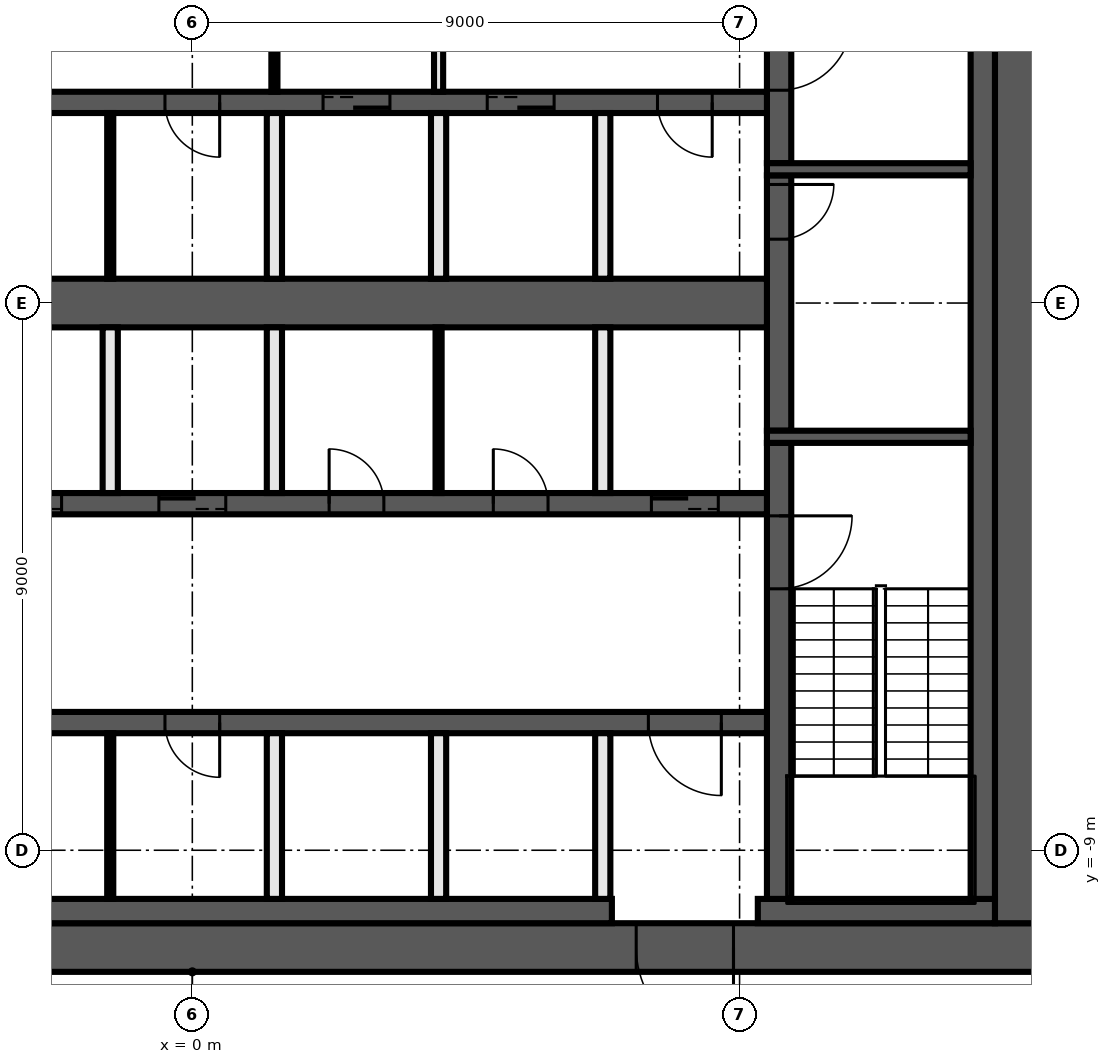
"""IFC4 building model, lengths in metres.
Left out: names, types, materials, properties, quantities, classifications, styles, units other than length and angle.
Written with IfcOpenShell. Run it as: python <this file> out.ifc"""

import sys

from ifc_helpers import new_model, si_unit, direction, frame, frame_2d, origin, place, context, subcontext, project, spatial, rectangle, extrude, element, fill, save


model = new_model("IFC4")
c1 = context("Model", 3, precision=1e-05, world=origin(), true_north=direction((0.0, 1.0)))
c2 = subcontext(c1, "Body", "Model", "MODEL_VIEW")
j1 = project(units=[si_unit("LENGTHUNIT", "METRE"), si_unit("PLANEANGLEUNIT", "RADIAN")], contexts=[c1])
p1 = place(None, origin())
s1 = spatial("IfcSite", under=j1, at=p1, CompositionType="ELEMENT")
p2 = place(p1, origin())
s2 = spatial("IfcBuilding", under=s1, at=p2, CompositionType="ELEMENT")
p3 = place(p2, frame((0.0, 0.0, 179.6)))
s3 = spatial("IfcBuildingStorey", under=s2, at=p3, CompositionType="ELEMENT", Elevation=179.6)
p4 = place(p3, frame((14.0, -10.6, 0.0), z_axis=(0.0, 0.0, 1.0), x_axis=(-1.0, 0.0, 0.0)))
e1 = element("IfcWall", 1, at=p4, inside=s3, PredefinedType="SHEAR", context=c2, shape_type="SweptSolid", body=[
    extrude(rectangle(XDim=28.0, YDim=0.8, at=frame_2d((14.0, 0.0))), origin(), (0.0, 0.0, 1.0), 3.7),
])
p5 = place(p4, frame((5.1, 0.0, 0.0)))
e2 = element("IfcOpeningElement", 2, at=p5, cuts=e1, PredefinedType="OPENING", context=c2, shape_type="SweptSolid", body=[
    extrude(rectangle(XDim=1.6, YDim=2.1, at=frame_2d((0.8, 1.05))), frame((0.0, 0.41, 0.0), z_axis=(0.0, -1.0, 0.0), x_axis=(1.0, 0.0, 0.0)), (0.0, 0.0, 1.0), 0.82),
])
p6 = place(p3, frame((13.6, 10.2, 0.0), z_axis=(0.0, 0.0, 1.0), x_axis=(0.0, -1.0, 0.0)))
e3 = element("IfcWall", 3, at=p6, inside=s3, PredefinedType="SHEAR", context=c2, shape_type="SweptSolid", body=[
    extrude(rectangle(XDim=20.4, YDim=0.8, at=frame_2d((10.2, 0.0))), origin(), (0.0, 0.0, 1.0), 3.7),
])
p7 = place(p3, frame((13.2, -10.0, 0.0), z_axis=(0.0, 0.0, 1.0), x_axis=(-1.0, 0.0, 0.0)))
e4 = element("IfcWall", 4, at=p7, inside=s3, PredefinedType="SHEAR", context=c2, shape_type="SweptSolid", body=[
    extrude(rectangle(XDim=3.9, YDim=0.4, at=frame_2d((1.95, 0.0))), origin(), (0.0, 0.0, 1.0), 3.7),
])
p8 = place(p3, frame((6.9, -10.0, 0.0), z_axis=(0.0, 0.0, 1.0), x_axis=(-1.0, 0.0, 0.0)))
e5 = element("IfcWall", 5, at=p8, inside=s3, PredefinedType="SHEAR", context=c2, shape_type="SweptSolid", body=[
    extrude(rectangle(XDim=20.1, YDim=0.4, at=frame_2d((10.05, 0.0))), origin(), (0.0, 0.0, 1.0), 3.7),
])
p9 = place(p3, frame((13.0, 9.8, 0.0), z_axis=(0.0, 0.0, 1.0), x_axis=(0.0, -1.0, 0.0)))
e6 = element("IfcWall", 6, at=p9, inside=s3, PredefinedType="SHEAR", context=c2, shape_type="SweptSolid", body=[
    extrude(rectangle(XDim=19.6, YDim=0.4, at=frame_2d((9.8, 0.0))), origin(), (0.0, 0.0, 1.0), 3.7),
])
p10 = place(p3, frame((9.65, -2.3, 0.0), z_axis=(0.0, 0.0, 1.0), x_axis=(0.0, -1.0, 0.0)))
e7 = element("IfcWall", 7, at=p10, inside=s3, PredefinedType="SHEAR", context=c2, shape_type="SweptSolid", body=[
    extrude(rectangle(XDim=7.5, YDim=0.4, at=frame_2d((3.75, 0.0))), origin(), (0.0, 0.0, 1.0), 3.7),
])
p11 = place(p10, frame((1.2, 0.0, 0.0)))
e8 = element("IfcOpeningElement", 8, at=p11, cuts=e7, PredefinedType="OPENING", context=c2, shape_type="SweptSolid", body=[
    extrude(rectangle(XDim=1.2, YDim=2.1, at=frame_2d((0.6, 1.05))), frame((0.0, 0.21, 0.0), z_axis=(0.0, -1.0, 0.0), x_axis=(1.0, 0.0, 0.0)), (0.0, 0.0, 1.0), 0.42),
])
p12 = place(p3, frame((9.65, 2.1, 0.0), z_axis=(0.0, 0.0, 1.0), x_axis=(0.0, -1.0, 0.0)))
e9 = element("IfcWall", 9, at=p12, inside=s3, PredefinedType="SHEAR", context=c2, shape_type="SweptSolid", body=[
    extrude(rectangle(XDim=4.2, YDim=0.4, at=frame_2d((2.1, 0.0))), origin(), (0.0, 0.0, 1.0), 3.7),
])
p13 = place(p12, frame((0.15, 0.0, 0.0)))
e10 = element("IfcOpeningElement", 10, at=p13, cuts=e9, PredefinedType="OPENING", context=c2, shape_type="SweptSolid", body=[
    extrude(rectangle(XDim=0.9, YDim=2.1, at=frame_2d((0.45, 1.05))), frame((0.0, 0.21, 0.0), z_axis=(0.0, -1.0, 0.0), x_axis=(1.0, 0.0, 0.0)), (0.0, 0.0, 1.0), 0.42),
])
p14 = place(p3, frame((9.65, 9.8, 0.0), z_axis=(0.0, 0.0, 1.0), x_axis=(0.0, -1.0, 0.0)))
e11 = element("IfcWall", 11, at=p14, inside=s3, PredefinedType="SHEAR", context=c2, shape_type="SweptSolid", body=[
    extrude(rectangle(XDim=7.5, YDim=0.4, at=frame_2d((3.75, 0.0))), origin(), (0.0, 0.0, 1.0), 3.7),
])
p15 = place(p14, frame((5.1, 0.0, 0.0)))
e12 = element("IfcOpeningElement", 12, at=p15, cuts=e11, PredefinedType="OPENING", context=c2, shape_type="SweptSolid", body=[
    extrude(rectangle(XDim=1.2, YDim=2.1, at=frame_2d((0.6, 1.05))), frame((0.0, 0.21, 0.0), z_axis=(0.0, -1.0, 0.0), x_axis=(1.0, 0.0, 0.0)), (0.0, 0.0, 1.0), 0.42),
])
for number, where, z_axis, x_axis in (
    (13, (9.45, 2.2, 0.0), (0.0, 0.0, 1.0), (1.0, 0.0, 0.0)),
    (14, (9.45, -2.2, 0.0), (0.0, 0.0, 1.0), (1.0, 0.0, 0.0)),
):
    element("IfcWall", number, at=place(p3, frame(where, z_axis=z_axis, x_axis=x_axis)), inside=s3, PredefinedType="SHEAR", context=c2, shape_type="SweptSolid", body=[
        extrude(rectangle(XDim=3.35, YDim=0.2, at=frame_2d((1.675, 0.0))), origin(), (0.0, 0.0, 1.0), 3.7),
    ])
p16 = place(p3, frame((9.45, 3.3, 0.0), z_axis=(0.0, 0.0, 1.0), x_axis=(-1.0, 0.0, 0.0)))
e15 = element("IfcWall", 15, at=p16, inside=s3, PredefinedType="SHEAR", context=c2, shape_type="SweptSolid", body=[
    extrude(rectangle(XDim=18.9, YDim=0.35, at=frame_2d((9.45, 0.0))), origin(), (0.0, 0.0, 1.0), 3.7),
])
p17 = place(p16, frame((6.2, 0.0, 0.0)))
e16 = element("IfcOpeningElement", 16, at=p17, cuts=e15, PredefinedType="OPENING", context=c2, shape_type="SweptSolid", body=[
    extrude(rectangle(XDim=1.1, YDim=2.1, at=frame_2d((0.55, 1.05))), frame((0.0, 0.185, 0.0), z_axis=(0.0, -1.0, 0.0), x_axis=(1.0, 0.0, 0.0)), (0.0, 0.0, 1.0), 0.37),
])
p18 = place(p16, frame((3.5, 0.0, 0.0)))
e17 = element("IfcOpeningElement", 17, at=p18, cuts=e15, PredefinedType="OPENING", context=c2, shape_type="SweptSolid", body=[
    extrude(rectangle(XDim=1.1, YDim=2.1, at=frame_2d((0.55, 1.05))), frame((0.0, 0.185, 0.0), z_axis=(0.0, -1.0, 0.0), x_axis=(1.0, 0.0, 0.0)), (0.0, 0.0, 1.0), 0.37),
])
p19 = place(p16, frame((0.9, 0.0, 0.0)))
e18 = element("IfcOpeningElement", 18, at=p19, cuts=e15, PredefinedType="OPENING", context=c2, shape_type="SweptSolid", body=[
    extrude(rectangle(XDim=0.9, YDim=2.1, at=frame_2d((0.45, 1.05))), frame((0.0, 0.185, 0.0), z_axis=(0.0, -1.0, 0.0), x_axis=(1.0, 0.0, 0.0)), (0.0, 0.0, 1.0), 0.37),
])
p20 = place(p16, frame((14.4, 0.0, 0.0)))
e19 = element("IfcOpeningElement", 19, at=p20, cuts=e15, PredefinedType="OPENING", context=c2, shape_type="SweptSolid", body=[
    extrude(rectangle(XDim=0.9, YDim=2.1, at=frame_2d((0.45, 1.05))), frame((0.0, 0.185, 0.0), z_axis=(0.0, -1.0, 0.0), x_axis=(1.0, 0.0, 0.0)), (0.0, 0.0, 1.0), 0.37),
])
p21 = place(p16, frame((9.0, 0.0, 0.0)))
e20 = element("IfcOpeningElement", 20, at=p21, cuts=e15, PredefinedType="OPENING", context=c2, shape_type="SweptSolid", body=[
    extrude(rectangle(XDim=0.9, YDim=2.1, at=frame_2d((0.45, 1.05))), frame((0.0, 0.185, 0.0), z_axis=(0.0, -1.0, 0.0), x_axis=(1.0, 0.0, 0.0)), (0.0, 0.0, 1.0), 0.37),
])
p22 = place(p3, frame((-9.45, -3.3, 0.0), z_axis=(0.0, 0.0, 1.0), x_axis=(1.0, 0.0, 0.0)))
e21 = element("IfcWall", 21, at=p22, inside=s3, PredefinedType="SHEAR", context=c2, shape_type="SweptSolid", body=[
    extrude(rectangle(XDim=18.9, YDim=0.35, at=frame_2d((9.45, 0.0))), origin(), (0.0, 0.0, 1.0), 3.7),
])
p23 = place(p22, frame((0.8, 0.0, 0.0)))
e22 = element("IfcOpeningElement", 22, at=p23, cuts=e21, PredefinedType="OPENING", context=c2, shape_type="SweptSolid", body=[
    extrude(rectangle(XDim=1.1, YDim=2.1, at=frame_2d((0.55, 1.05))), frame((0.0, 0.185, 0.0), z_axis=(0.0, -1.0, 0.0), x_axis=(1.0, 0.0, 0.0)), (0.0, 0.0, 1.0), 0.37),
])
p24 = place(p22, frame((3.5, 0.0, 0.0)))
e23 = element("IfcOpeningElement", 23, at=p24, cuts=e21, PredefinedType="OPENING", context=c2, shape_type="SweptSolid", body=[
    extrude(rectangle(XDim=1.1, YDim=2.1, at=frame_2d((0.55, 1.05))), frame((0.0, 0.185, 0.0), z_axis=(0.0, -1.0, 0.0), x_axis=(1.0, 0.0, 0.0)), (0.0, 0.0, 1.0), 0.37),
])
p25 = place(p22, frame((6.2, 0.0, 0.0)))
e24 = element("IfcOpeningElement", 24, at=p25, cuts=e21, PredefinedType="OPENING", context=c2, shape_type="SweptSolid", body=[
    extrude(rectangle(XDim=1.1, YDim=2.1, at=frame_2d((0.55, 1.05))), frame((0.0, 0.185, 0.0), z_axis=(0.0, -1.0, 0.0), x_axis=(1.0, 0.0, 0.0)), (0.0, 0.0, 1.0), 0.37),
])
p26 = place(p22, frame((8.9, 0.0, 0.0)))
e25 = element("IfcOpeningElement", 25, at=p26, cuts=e21, PredefinedType="OPENING", context=c2, shape_type="SweptSolid", body=[
    extrude(rectangle(XDim=1.1, YDim=2.1, at=frame_2d((0.55, 1.05))), frame((0.0, 0.185, 0.0), z_axis=(0.0, -1.0, 0.0), x_axis=(1.0, 0.0, 0.0)), (0.0, 0.0, 1.0), 0.37),
])
p27 = place(p22, frame((17.0, 0.0, 0.0)))
e26 = element("IfcOpeningElement", 26, at=p27, cuts=e21, PredefinedType="OPENING", context=c2, shape_type="SweptSolid", body=[
    extrude(rectangle(XDim=1.1, YDim=2.1, at=frame_2d((0.55, 1.05))), frame((0.0, 0.185, 0.0), z_axis=(0.0, -1.0, 0.0), x_axis=(1.0, 0.0, 0.0)), (0.0, 0.0, 1.0), 0.37),
])
p28 = place(p22, frame((11.7, 0.0, 0.0)))
e27 = element("IfcOpeningElement", 27, at=p28, cuts=e21, PredefinedType="OPENING", context=c2, shape_type="SweptSolid", body=[
    extrude(rectangle(XDim=0.9, YDim=2.1, at=frame_2d((0.45, 1.05))), frame((0.0, 0.185, 0.0), z_axis=(0.0, -1.0, 0.0), x_axis=(1.0, 0.0, 0.0)), (0.0, 0.0, 1.0), 0.37),
])
p29 = place(p22, frame((14.4, 0.0, 0.0)))
e28 = element("IfcOpeningElement", 28, at=p29, cuts=e21, PredefinedType="OPENING", context=c2, shape_type="SweptSolid", body=[
    extrude(rectangle(XDim=0.9, YDim=2.1, at=frame_2d((0.45, 1.05))), frame((0.0, 0.185, 0.0), z_axis=(0.0, -1.0, 0.0), x_axis=(1.0, 0.0, 0.0)), (0.0, 0.0, 1.0), 0.37),
])
p30 = place(p3, frame((9.45, -6.9, 0.0), z_axis=(0.0, 0.0, 1.0), x_axis=(-1.0, 0.0, 0.0)))
e29 = element("IfcWall", 29, at=p30, inside=s3, PredefinedType="SHEAR", context=c2, shape_type="SweptSolid", body=[
    extrude(rectangle(XDim=18.9, YDim=0.35, at=frame_2d((9.45, 0.0))), origin(), (0.0, 0.0, 1.0), 3.7),
])
p31 = place(p30, frame((0.75, 0.0, 0.0)))
e30 = element("IfcOpeningElement", 30, at=p31, cuts=e29, PredefinedType="OPENING", context=c2, shape_type="SweptSolid", body=[
    extrude(rectangle(XDim=1.2, YDim=2.1, at=frame_2d((0.6, 1.05))), frame((0.0, 0.185, 0.0), z_axis=(0.0, -1.0, 0.0), x_axis=(1.0, 0.0, 0.0)), (0.0, 0.0, 1.0), 0.37),
])
p32 = place(p30, frame((14.4, 0.0, 0.0)))
e31 = element("IfcOpeningElement", 31, at=p32, cuts=e29, PredefinedType="OPENING", context=c2, shape_type="SweptSolid", body=[
    extrude(rectangle(XDim=0.9, YDim=2.1, at=frame_2d((0.45, 1.05))), frame((0.0, 0.185, 0.0), z_axis=(0.0, -1.0, 0.0), x_axis=(1.0, 0.0, 0.0)), (0.0, 0.0, 1.0), 0.37),
])
p33 = place(p30, frame((9.0, 0.0, 0.0)))
e32 = element("IfcOpeningElement", 32, at=p33, cuts=e29, PredefinedType="OPENING", context=c2, shape_type="SweptSolid", body=[
    extrude(rectangle(XDim=0.9, YDim=2.1, at=frame_2d((0.45, 1.05))), frame((0.0, 0.185, 0.0), z_axis=(0.0, -1.0, 0.0), x_axis=(1.0, 0.0, 0.0)), (0.0, 0.0, 1.0), 0.37),
])
p34 = place(p3, frame((-9.45, 0.0, 0.0), z_axis=(0.0, 0.0, 1.0), x_axis=(1.0, 0.0, 0.0)))
e33 = element("IfcWall", 33, at=p34, inside=s3, PredefinedType="SHEAR", context=c2, shape_type="SweptSolid", body=[
    extrude(rectangle(XDim=18.9, YDim=0.8, at=frame_2d((9.45, 0.0))), origin(), (0.0, 0.0, 1.0), 3.7),
])
for number, where, z_axis, x_axis in (
    (34, (6.75, -9.8, 0.0), (0.0, 0.0, 1.0), (0.0, 1.0, 0.0)),
    (35, (6.75, -3.125, 0.0), (0.0, 0.0, 1.0), (0.0, 1.0, 0.0)),
    (36, (6.75, 0.4, 0.0), (0.0, 0.0, 1.0), (0.0, 1.0, 0.0)),
):
    element("IfcWall", number, at=place(p3, frame(where, z_axis=z_axis, x_axis=x_axis)), inside=s3, PredefinedType="SOLIDWALL", context=c2, shape_type="SweptSolid", body=[
        extrude(rectangle(XDim=2.725, YDim=0.25, at=frame_2d((1.363, 0.0))), origin(), (0.0, 0.0, 1.0), 3.7),
    ])
p35 = place(p3, frame((4.05, 6.725, 0.0), z_axis=(0.0, 0.0, 1.0), x_axis=(0.0, -1.0, 0.0)))
e37 = element("IfcWall", 37, at=p35, inside=s3, PredefinedType="PARTITIONING", context=c2, shape_type="SweptSolid", body=[
    extrude(rectangle(XDim=3.25, YDim=0.15, at=frame_2d((1.625, 0.0))), origin(), (0.0, 0.0, 1.0), 3.7),
])
p36 = place(p35, frame((1.025, 0.0, 0.0)))
e38 = element("IfcOpeningElement", 38, at=p36, cuts=e37, PredefinedType="OPENING", context=c2, shape_type="SweptSolid", body=[
    extrude(rectangle(XDim=1.2, YDim=2.1, at=frame_2d((0.6, 1.05))), frame((0.0, 0.085, 0.0), z_axis=(0.0, -1.0, 0.0), x_axis=(1.0, 0.0, 0.0)), (0.0, 0.0, 1.0), 0.17),
])
p37 = place(p3, frame((4.05, -3.125, 0.0), z_axis=(0.0, 0.0, 1.0), x_axis=(0.0, 1.0, 0.0)))
e39 = element("IfcWall", 39, at=p37, inside=s3, PredefinedType="PARTITIONING", context=c2, shape_type="SweptSolid", body=[
    extrude(rectangle(XDim=2.725, YDim=0.1, at=frame_2d((1.363, 0.0))), origin(), (0.0, 0.0, 1.0), 3.7),
])
for number, where, z_axis, x_axis in (
    (40, (4.05, -9.8, 0.0), (0.0, 0.0, 1.0), (0.0, 1.0, 0.0)),
    (41, (4.05, 0.4, 0.0), (0.0, 0.0, 1.0), (0.0, 1.0, 0.0)),
):
    element("IfcWall", number, at=place(p3, frame(where, z_axis=z_axis, x_axis=x_axis)), inside=s3, PredefinedType="SOLIDWALL", context=c2, shape_type="SweptSolid", body=[
        extrude(rectangle(XDim=2.725, YDim=0.25, at=frame_2d((1.363, 0.0))), origin(), (0.0, 0.0, 1.0), 3.7),
    ])
p38 = place(p3, frame((1.35, 6.725, 0.0), z_axis=(0.0, 0.0, 1.0), x_axis=(0.0, -1.0, 0.0)))
e42 = element("IfcWall", 42, at=p38, inside=s3, PredefinedType="PARTITIONING", context=c2, shape_type="SweptSolid", body=[
    extrude(rectangle(XDim=3.25, YDim=0.1, at=frame_2d((1.625, 0.0))), origin(), (0.0, 0.0, 1.0), 3.7),
])
p39 = place(p38, frame((1.025, 0.0, 0.0)))
e43 = element("IfcOpeningElement", 43, at=p39, cuts=e42, PredefinedType="OPENING", context=c2, shape_type="SweptSolid", body=[
    extrude(rectangle(XDim=1.2, YDim=2.1, at=frame_2d((0.6, 1.05))), frame((0.0, 0.06, 0.0), z_axis=(0.0, -1.0, 0.0), x_axis=(1.0, 0.0, 0.0)), (0.0, 0.0, 1.0), 0.12),
])
for number, where, z_axis, x_axis in (
    (44, (1.35, -9.8, 0.0), (0.0, 0.0, 1.0), (0.0, 1.0, 0.0)),
    (45, (1.35, -3.125, 0.0), (0.0, 0.0, 1.0), (0.0, 1.0, 0.0)),
    (46, (1.35, 0.4, 0.0), (0.0, 0.0, 1.0), (0.0, 1.0, 0.0)),
):
    element("IfcWall", number, at=place(p3, frame(where, z_axis=z_axis, x_axis=x_axis)), inside=s3, PredefinedType="SOLIDWALL", context=c2, shape_type="SweptSolid", body=[
        extrude(rectangle(XDim=2.725, YDim=0.25, at=frame_2d((1.363, 0.0))), origin(), (0.0, 0.0, 1.0), 3.7),
    ])
for number, where, z_axis, x_axis in (
    (47, (-1.35, -9.8, 0.0), (0.0, 0.0, 1.0), (0.0, 1.0, 0.0)),
    (48, (-1.35, 0.4, 0.0), (0.0, 0.0, 1.0), (0.0, 1.0, 0.0)),
):
    element("IfcWall", number, at=place(p3, frame(where, z_axis=z_axis, x_axis=x_axis)), inside=s3, PredefinedType="PARTITIONING", context=c2, shape_type="SweptSolid", body=[
        extrude(rectangle(XDim=2.725, YDim=0.1, at=frame_2d((1.363, 0.0))), origin(), (0.0, 0.0, 1.0), 3.7),
    ])
p40 = place(p3, frame((-1.35, -3.125, 0.0), z_axis=(0.0, 0.0, 1.0), x_axis=(0.0, 1.0, 0.0)))
e49 = element("IfcWall", 49, at=p40, inside=s3, PredefinedType="SOLIDWALL", context=c2, shape_type="SweptSolid", body=[
    extrude(rectangle(XDim=2.725, YDim=0.25, at=frame_2d((1.363, 0.0))), origin(), (0.0, 0.0, 1.0), 3.7),
])
p41 = place(p13, origin())
e50 = element("IfcDoor", 50, at=p41, inside=s3, OperationType="SINGLE_SWING_RIGHT", PredefinedType="DOOR", context=c2, shape_type="SweptSolid", body=[
    extrude(rectangle(XDim=0.9, YDim=2.1, at=frame_2d((0.45, 1.05))), frame((0.0, 0.025, 0.0), z_axis=(0.0, -1.0, 0.0), x_axis=(1.0, 0.0, 0.0)), (0.0, 0.0, 1.0), 0.05),
])
fill(e10, e50)
p42 = place(p17, origin())
e51 = element("IfcDoor", 51, at=p42, inside=s3, OperationType="DOUBLE_DOOR_SLIDING", PredefinedType="DOOR", context=c2, shape_type="SweptSolid", body=[
    extrude(rectangle(XDim=1.1, YDim=2.1, at=frame_2d((0.55, 1.05))), frame((0.0, 0.025, 0.0), z_axis=(0.0, -1.0, 0.0), x_axis=(1.0, 0.0, 0.0)), (0.0, 0.0, 1.0), 0.05),
])
fill(e16, e51)
p43 = place(p18, origin())
e52 = element("IfcDoor", 52, at=p43, inside=s3, OperationType="DOUBLE_DOOR_SLIDING", PredefinedType="DOOR", context=c2, shape_type="SweptSolid", body=[
    extrude(rectangle(XDim=1.1, YDim=2.1, at=frame_2d((0.55, 1.05))), frame((0.0, 0.025, 0.0), z_axis=(0.0, -1.0, 0.0), x_axis=(1.0, 0.0, 0.0)), (0.0, 0.0, 1.0), 0.05),
])
fill(e17, e52)
p44 = place(p19, origin())
e53 = element("IfcDoor", 53, at=p44, inside=s3, OperationType="SINGLE_SWING_LEFT", PredefinedType="DOOR", context=c2, shape_type="SweptSolid", body=[
    extrude(rectangle(XDim=0.9, YDim=2.1, at=frame_2d((0.45, 1.05))), frame((0.0, 0.025, 0.0), z_axis=(0.0, -1.0, 0.0), x_axis=(1.0, 0.0, 0.0)), (0.0, 0.0, 1.0), 0.05),
])
fill(e18, e53)
p45 = place(p25, origin())
e54 = element("IfcDoor", 54, at=p45, inside=s3, OperationType="DOUBLE_DOOR_SLIDING", PredefinedType="DOOR", context=c2, shape_type="SweptSolid", body=[
    extrude(rectangle(XDim=1.1, YDim=2.1, at=frame_2d((0.55, 1.05))), frame((0.0, 0.025, 0.0), z_axis=(0.0, -1.0, 0.0), x_axis=(1.0, 0.0, 0.0)), (0.0, 0.0, 1.0), 0.05),
])
fill(e24, e54)
p46 = place(p26, origin())
e55 = element("IfcDoor", 55, at=p46, inside=s3, OperationType="DOUBLE_DOOR_SLIDING", PredefinedType="DOOR", context=c2, shape_type="SweptSolid", body=[
    extrude(rectangle(XDim=1.1, YDim=2.1, at=frame_2d((0.55, 1.05))), frame((0.0, 0.025, 0.0), z_axis=(0.0, -1.0, 0.0), x_axis=(1.0, 0.0, 0.0)), (0.0, 0.0, 1.0), 0.05),
])
fill(e25, e55)
p47 = place(p27, origin())
e56 = element("IfcDoor", 56, at=p47, inside=s3, OperationType="DOUBLE_DOOR_SLIDING", PredefinedType="DOOR", context=c2, shape_type="SweptSolid", body=[
    extrude(rectangle(XDim=1.1, YDim=2.1, at=frame_2d((0.55, 1.05))), frame((0.0, 0.025, 0.0), z_axis=(0.0, -1.0, 0.0), x_axis=(1.0, 0.0, 0.0)), (0.0, 0.0, 1.0), 0.05),
])
fill(e26, e56)
p48 = place(p5, origin())
e57 = element("IfcDoor", 57, at=p48, inside=s3, OperationType="DOUBLE_DOOR_SINGLE_SWING", PredefinedType="DOOR", context=c2, shape_type="SweptSolid", body=[
    extrude(rectangle(XDim=1.6, YDim=2.1, at=frame_2d((0.8, 1.05))), frame((0.0, 0.025, 0.0), z_axis=(0.0, -1.0, 0.0), x_axis=(1.0, 0.0, 0.0)), (0.0, 0.0, 1.0), 0.05),
])
fill(e2, e57)
p49 = place(p31, origin())
e58 = element("IfcDoor", 58, at=p49, inside=s3, OperationType="SINGLE_SWING_LEFT", PredefinedType="DOOR", context=c2, shape_type="SweptSolid", body=[
    extrude(rectangle(XDim=1.2, YDim=2.1, at=frame_2d((0.6, 1.05))), frame((0.0, 0.025, 0.0), z_axis=(0.0, -1.0, 0.0), x_axis=(1.0, 0.0, 0.0)), (0.0, 0.0, 1.0), 0.05),
])
fill(e30, e58)
p50 = place(p21, origin())
e59 = element("IfcDoor", 59, at=p50, inside=s3, OperationType="SINGLE_SWING_LEFT", PredefinedType="DOOR", context=c2, shape_type="SweptSolid", body=[
    extrude(rectangle(XDim=0.9, YDim=2.1, at=frame_2d((0.45, 1.05))), frame((0.0, 0.025, 0.0), z_axis=(0.0, -1.0, 0.0), x_axis=(1.0, 0.0, 0.0)), (0.0, 0.0, 1.0), 0.05),
])
fill(e20, e59)
p51 = place(p28, origin())
e60 = element("IfcDoor", 60, at=p51, inside=s3, OperationType="SINGLE_SWING_RIGHT", PredefinedType="DOOR", context=c2, shape_type="SweptSolid", body=[
    extrude(rectangle(XDim=0.9, YDim=2.1, at=frame_2d((0.45, 1.05))), frame((0.0, 0.025, 0.0), z_axis=(0.0, -1.0, 0.0), x_axis=(1.0, 0.0, 0.0)), (0.0, 0.0, 1.0), 0.05),
])
fill(e27, e60)
p52 = place(p29, origin())
e61 = element("IfcDoor", 61, at=p52, inside=s3, OperationType="SINGLE_SWING_LEFT", PredefinedType="DOOR", context=c2, shape_type="SweptSolid", body=[
    extrude(rectangle(XDim=0.9, YDim=2.1, at=frame_2d((0.45, 1.05))), frame((0.0, 0.025, 0.0), z_axis=(0.0, -1.0, 0.0), x_axis=(1.0, 0.0, 0.0)), (0.0, 0.0, 1.0), 0.05),
])
fill(e28, e61)
p53 = place(p33, origin())
e62 = element("IfcDoor", 62, at=p53, inside=s3, OperationType="SINGLE_SWING_LEFT", PredefinedType="DOOR", context=c2, shape_type="SweptSolid", body=[
    extrude(rectangle(XDim=0.9, YDim=2.1, at=frame_2d((0.45, 1.05))), frame((0.0, 0.025, 0.0), z_axis=(0.0, -1.0, 0.0), x_axis=(1.0, 0.0, 0.0)), (0.0, 0.0, 1.0), 0.05),
])
fill(e32, e62)
p54 = place(p15, origin())
e63 = element("IfcDoor", 63, at=p54, inside=s3, OperationType="SINGLE_SWING_LEFT", PredefinedType="DOOR", context=c2, shape_type="SweptSolid", body=[
    extrude(rectangle(XDim=1.2, YDim=2.1, at=frame_2d((0.6, 1.05))), frame((0.0, 0.025, 0.0), z_axis=(0.0, -1.0, 0.0), x_axis=(1.0, 0.0, 0.0)), (0.0, 0.0, 1.0), 0.05),
])
fill(e12, e63)
p55 = place(p11, origin())
e64 = element("IfcDoor", 64, at=p55, inside=s3, OperationType="SINGLE_SWING_RIGHT", PredefinedType="DOOR", context=c2, shape_type="SweptSolid", body=[
    extrude(rectangle(XDim=1.2, YDim=2.1, at=frame_2d((0.6, 1.05))), frame((0.0, 0.025, 0.0), z_axis=(0.0, -1.0, 0.0), x_axis=(1.0, 0.0, 0.0)), (0.0, 0.0, 1.0), 0.05),
])
fill(e8, e64)
save(model, sys.argv[1])
